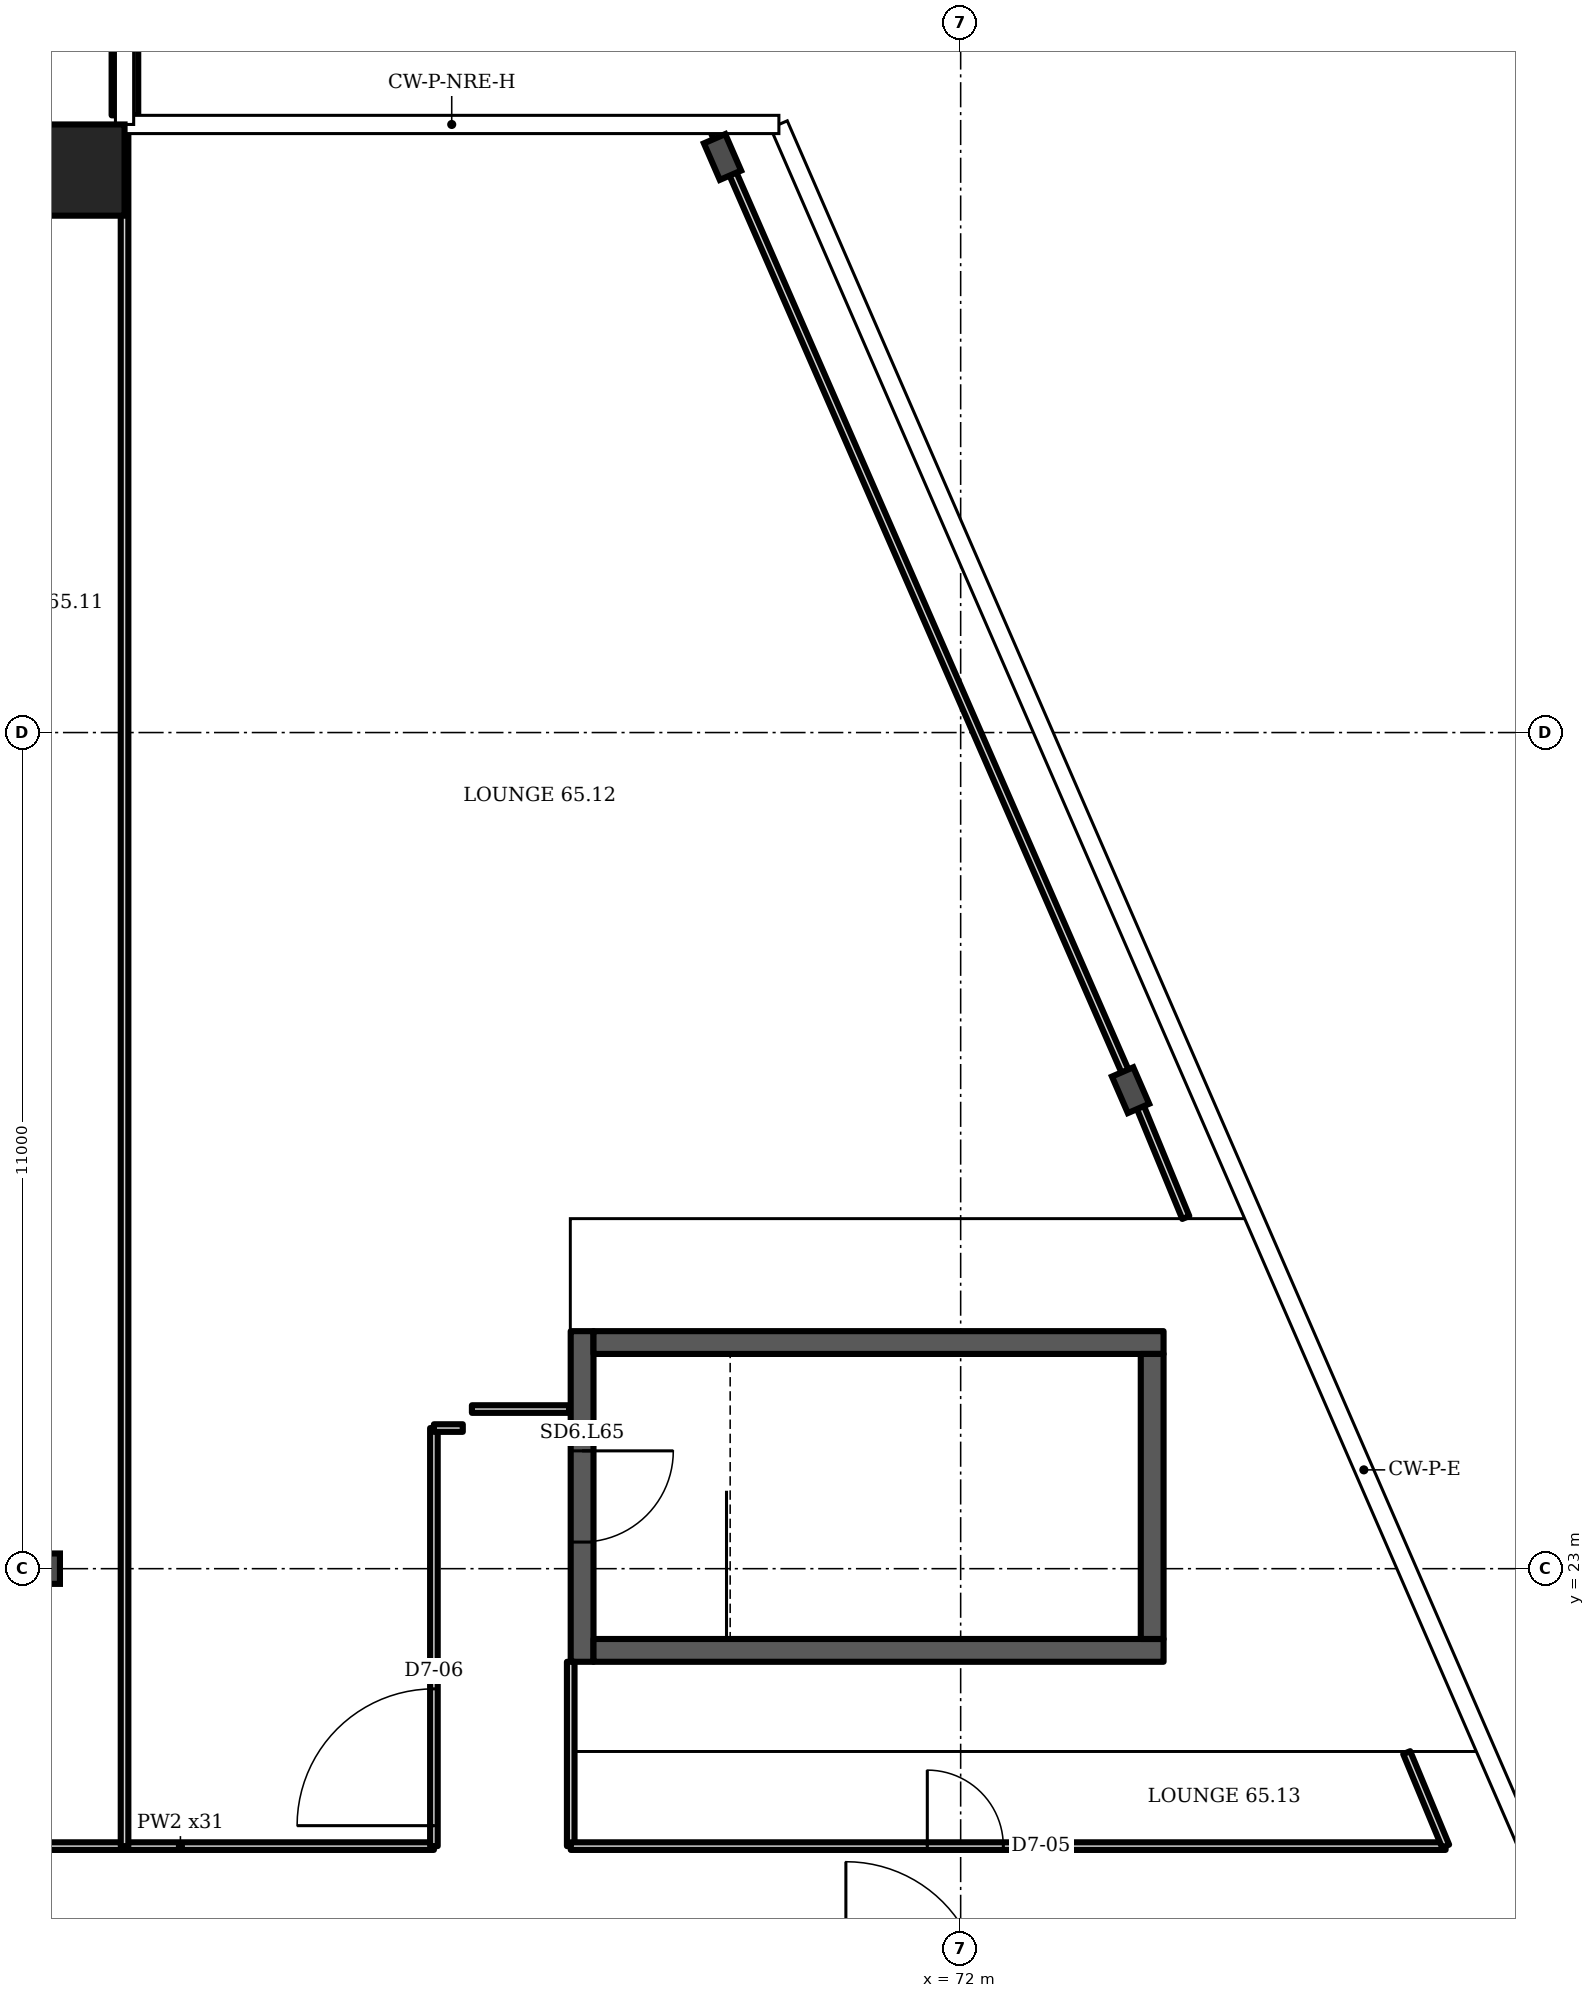
"""IFC4 building model, lengths in metres.
Left out: names, types, materials, properties, quantities, classifications, styles, units other than length and angle.
Written with IfcOpenShell. Run it as: python <this file> out.ifc"""

import sys

from ifc_helpers import new_model, si_unit, direction, frame, frame_2d, origin, origin_2d, place, context, subcontext, project, spatial, rectangle, i_section, extrude, element, fill, save


model = new_model("IFC4")
c1 = context("Model", 3, precision=1e-05, world=origin(), true_north=direction((0.0, 1.0)))
c2 = subcontext(c1, "Body", "Model", "MODEL_VIEW")
j1 = project(units=[si_unit("LENGTHUNIT", "METRE"), si_unit("PLANEANGLEUNIT", "RADIAN")], contexts=[c1])
p1 = place(None, origin())
s1 = spatial("IfcSite", under=j1, at=p1, CompositionType="ELEMENT")
p2 = place(p1, origin())
s2 = spatial("IfcBuilding", under=s1, at=p2, CompositionType="ELEMENT")
p3 = place(p2, frame((0.0, 0.0, 257.5)))
s3 = spatial("IfcBuildingStorey", under=s2, at=p3, CompositionType="ELEMENT", Elevation=257.5)
p4 = place(p3, frame((60.4, 41.4, 0.0), z_axis=(0.0, 0.0, 1.0), x_axis=(1.0, 0.0, 0.0)))
e1 = element("IfcColumn", 1, at=p4, inside=s3, PredefinedType="COLUMN", context=c2, shape_type="SweptSolid", body=[
    extrude(rectangle(XDim=1.2, YDim=1.2, at=origin_2d()), origin(), (0.0, 0.0, 1.0), 3.6),
])
for number, where, z_axis, x_axis in (
    (2, (74.235, 29.295, 0.0), (0.0, 0.0, 1.0), (0.917, 0.399, 0.0)),
    (3, (68.867, 41.572, 0.0), (0.0, 0.0, 1.0), (0.917, 0.399, 0.0)),
):
    element("IfcColumn", number, at=place(p3, frame(where, z_axis=z_axis, x_axis=x_axis)), inside=s3, PredefinedType="COLUMN", context=c2, shape_type="SweptSolid", body=[
        extrude(i_section(OverallWidth=0.306, OverallDepth=0.524, WebThickness=0.021, FlangeThickness=0.04, FilletRadius=0.027, at=origin_2d()), origin(), (0.0, 0.0, 1.0), 3.6),
    ])
p5 = place(p3, frame((60.0, 23.0, 0.0), z_axis=(0.0, 0.0, 1.0), x_axis=(1.0, 0.0, 0.0)))
e4 = element("IfcColumn", 4, at=p5, inside=s3, PredefinedType="COLUMN", context=c2, shape_type="SweptSolid", body=[
    extrude(i_section(OverallWidth=0.3, OverallDepth=0.4, WebThickness=0.013, FlangeThickness=0.024, FilletRadius=0.027, at=origin_2d()), origin(), (0.0, 0.0, 1.0), 3.6),
])
p6 = place(p3, frame((61.005, 42.12, 0.0), z_axis=(0.0, 0.0, 1.0), x_axis=(0.0, 1.0, 0.0)))
e5 = element("IfcWall", 5, at=p6, inside=s3, PredefinedType="SOLIDWALL", context=c2, shape_type="SweptSolid", body=[
    extrude(rectangle(XDim=6.006, YDim=0.35, at=frame_2d((3.003, 0.0))), origin(), (0.0, 0.0, 1.0), 1.0),
])
p7 = place(p3, frame((67.02, 21.775, 0.0), z_axis=(0.0, 0.0, 1.0), x_axis=(0.0, 1.0, 0.0)))
e6 = element("IfcWall", 6, at=p7, inside=s3, PredefinedType="SHEAR", context=c2, shape_type="SweptSolid", body=[
    extrude(rectangle(XDim=4.35, YDim=0.3, at=frame_2d((2.175, 0.0))), origin(), (0.0, 0.0, 1.0), 3.2),
])
p8 = place(p7, frame((1.575, 0.0, 0.0)))
e7 = element("IfcOpeningElement", 7, at=p8, cuts=e6, PredefinedType="OPENING", context=c2, shape_type="SweptSolid", body=[
    extrude(rectangle(XDim=1.2, YDim=2.1, at=frame_2d((0.6, 1.05))), frame((0.0, 0.16, 0.0), z_axis=(0.0, -1.0, 0.0), x_axis=(1.0, 0.0, 0.0)), (0.0, 0.0, 1.0), 0.32),
])
p9 = place(p3, frame((58.4, 19.35, 0.0), z_axis=(0.0, 0.0, 1.0), x_axis=(1.0, 0.0, 0.0)))
e8 = element("IfcWall", 8, at=p9, inside=s3, PredefinedType="PARTITIONING", context=c2, shape_type="SweptSolid", body=[
    extrude(rectangle(XDim=6.67, YDim=0.1, at=frame_2d((3.335, 0.0))), origin(), (0.0, 0.0, 1.0), 3.2),
])
p10 = place(p3, frame((61.0, 19.35, 0.0), z_axis=(0.0, 0.0, 1.0), x_axis=(0.0, 1.0, 0.0)))
e9 = element("IfcWall", 9, at=p10, inside=s3, PredefinedType="PARTITIONING", context=c2, shape_type="SweptSolid", body=[
    extrude(rectangle(XDim=22.63, YDim=0.1, at=frame_2d((11.315, 0.0))), origin(), (0.0, 0.0, 1.0), 3.2),
])
p11 = place(p3, frame((65.07, 19.35, 0.0), z_axis=(0.0, 0.0, 1.0), x_axis=(0.0, 1.0, 0.0)))
e10 = element("IfcWall", 10, at=p11, inside=s3, PredefinedType="PARTITIONING", context=c2, shape_type="SweptSolid", body=[
    extrude(rectangle(XDim=5.5, YDim=0.1, at=frame_2d((2.75, 0.0))), origin(), (0.0, 0.0, 1.0), 3.2),
])
p12 = place(p11, frame((0.269, 0.0, 0.0)))
e11 = element("IfcOpeningElement", 11, at=p12, cuts=e10, PredefinedType="OPENING", context=c2, shape_type="SweptSolid", body=[
    extrude(rectangle(XDim=1.8, YDim=2.1, at=frame_2d((0.9, 1.05))), frame((0.0, 0.06, 0.0), z_axis=(0.0, -1.0, 0.0), x_axis=(1.0, 0.0, 0.0)), (0.0, 0.0, 1.0), 0.12),
])
p13 = place(p3, frame((65.07, 24.85, 0.0), z_axis=(0.0, 0.0, 1.0), x_axis=(1.0, 0.0, 0.0)))
e12 = element("IfcWall", 12, at=p13, inside=s3, PredefinedType="PARTITIONING", context=c2, shape_type="SweptSolid", body=[
    extrude(rectangle(XDim=0.38, YDim=0.1, at=frame_2d((0.19, 0.0))), origin(), (0.0, 0.0, 1.0), 3.2),
])
p14 = place(p3, frame((65.57, 25.1, 0.0), z_axis=(0.0, 0.0, 1.0), x_axis=(1.0, 0.0, 0.0)))
e13 = element("IfcWall", 13, at=p14, inside=s3, PredefinedType="PARTITIONING", context=c2, shape_type="SweptSolid", body=[
    extrude(rectangle(XDim=1.28, YDim=0.1, at=frame_2d((0.64, 0.0))), origin(), (0.0, 0.0, 1.0), 3.2),
])
p15 = place(p3, frame((66.87, 19.35, 0.0), z_axis=(0.0, 0.0, 1.0), x_axis=(0.0, 1.0, 0.0)))
e14 = element("IfcWall", 14, at=p15, inside=s3, PredefinedType="PARTITIONING", context=c2, shape_type="SweptSolid", body=[
    extrude(rectangle(XDim=2.425, YDim=0.1, at=frame_2d((1.212, 0.0))), origin(), (0.0, 0.0, 1.0), 3.2),
])
p16 = place(p3, frame((66.87, 19.35, 0.0), z_axis=(0.0, 0.0, 1.0), x_axis=(1.0, 0.0, 0.0)))
e15 = element("IfcWall", 15, at=p16, inside=s3, PredefinedType="PARTITIONING", context=c2, shape_type="SweptSolid", body=[
    extrude(rectangle(XDim=11.51, YDim=0.1, at=frame_2d((5.755, 0.0))), origin(), (0.0, 0.0, 1.0), 3.2),
])
p17 = place(p16, frame((4.691, 0.0, 0.0)))
e16 = element("IfcOpeningElement", 16, at=p17, cuts=e15, PredefinedType="OPENING", context=c2, shape_type="SweptSolid", body=[
    extrude(rectangle(XDim=1.0, YDim=2.1, at=frame_2d((0.5, 1.05))), frame((0.0, 0.06, 0.0), z_axis=(0.0, -1.0, 0.0), x_axis=(1.0, 0.0, 0.0)), (0.0, 0.0, 1.0), 0.12),
])
p18 = place(p3, frame((74.265, 29.31, 0.0), z_axis=(0.0, 0.0, 1.0), x_axis=(-0.400401, 0.916335, 0.0)))
e17 = element("IfcWall", 17, at=p18, inside=s3, PredefinedType="PARTITIONING", context=c2, shape_type="SweptSolid", body=[
    extrude(rectangle(XDim=13.795, YDim=0.1, at=frame_2d((6.897, 0.0))), origin(), (0.0, 0.0, 1.0), 3.2),
])
p19 = place(p3, frame((74.962, 27.62, 0.0), z_axis=(0.0, 0.0, 1.0), x_axis=(-0.381293, 0.924452, 0.0)))
e18 = element("IfcWall", 18, at=p19, inside=s3, PredefinedType="PARTITIONING", context=c2, shape_type="SweptSolid", body=[
    extrude(rectangle(XDim=1.828, YDim=0.1, at=frame_2d((0.914, 0.0))), origin(), (0.0, 0.0, 1.0), 3.2),
])
p20 = place(p3, frame((78.38, 19.35, 0.0), z_axis=(0.0, 0.0, 1.0), x_axis=(-0.383963, 0.923344, 0.0)))
e19 = element("IfcWall", 19, at=p20, inside=s3, PredefinedType="PARTITIONING", context=c2, shape_type="SweptSolid", body=[
    extrude(rectangle(XDim=1.332, YDim=0.1, at=frame_2d((0.666, 0.0))), origin(), (0.0, 0.0, 1.0), 3.2),
])
for number, where, z_axis, x_axis in (
    (20, (67.17, 21.925, 0.0), (0.0, 0.0, 1.0), (1.0, 0.0, 0.0)),
    (21, (67.17, 25.975, 0.0), (0.0, 0.0, 1.0), (1.0, 0.0, 0.0)),
):
    element("IfcWall", number, at=place(p3, frame(where, z_axis=z_axis, x_axis=x_axis)), inside=s3, PredefinedType="SHEAR", context=c2, shape_type="SweptSolid", body=[
        extrude(rectangle(XDim=7.5, YDim=0.3, at=frame_2d((3.75, 0.0))), origin(), (0.0, 0.0, 1.0), 3.2),
    ])
p21 = place(p3, frame((74.52, 22.075, 0.0), z_axis=(0.0, 0.0, 1.0), x_axis=(0.0, 1.0, 0.0)))
e22 = element("IfcWall", 22, at=p21, inside=s3, PredefinedType="SHEAR", context=c2, shape_type="SweptSolid", body=[
    extrude(rectangle(XDim=3.75, YDim=0.3, at=frame_2d((1.875, 0.0))), origin(), (0.0, 0.0, 1.0), 3.2),
])
p22 = place(p8, origin())
e23 = element("IfcDoor", 23, at=p22, inside=s3, OperationType="SINGLE_SWING_RIGHT", PredefinedType="DOOR", context=c2, shape_type="SweptSolid", body=[
    extrude(rectangle(XDim=1.2, YDim=2.1, at=frame_2d((0.6, 1.05))), frame((0.0, 0.025, 0.0), z_axis=(0.0, -1.0, 0.0), x_axis=(1.0, 0.0, 0.0)), (0.0, 0.0, 1.0), 0.05),
])
fill(e7, e23)
p23 = place(p17, origin())
e24 = element("IfcDoor", 24, at=p23, inside=s3, OperationType="SINGLE_SWING_LEFT", PredefinedType="DOOR", context=c2, shape_type="SweptSolid", body=[
    extrude(rectangle(XDim=1.0, YDim=2.1, at=frame_2d((0.5, 1.05))), frame((0.0, 0.025, 0.0), z_axis=(0.0, -1.0, 0.0), x_axis=(1.0, 0.0, 0.0)), (0.0, 0.0, 1.0), 0.05),
])
fill(e16, e24)
p24 = place(p12, origin())
e25 = element("IfcDoor", 25, at=p24, inside=s3, OperationType="DOUBLE_DOOR_SINGLE_SWING", PredefinedType="DOOR", context=c2, shape_type="SweptSolid", body=[
    extrude(rectangle(XDim=1.8, YDim=2.1, at=frame_2d((0.9, 1.05))), frame((0.0, 0.025, 0.0), z_axis=(0.0, -1.0, 0.0), x_axis=(1.0, 0.0, 0.0)), (0.0, 0.0, 1.0), 0.05),
])
fill(e11, e25)
save(model, sys.argv[1])
